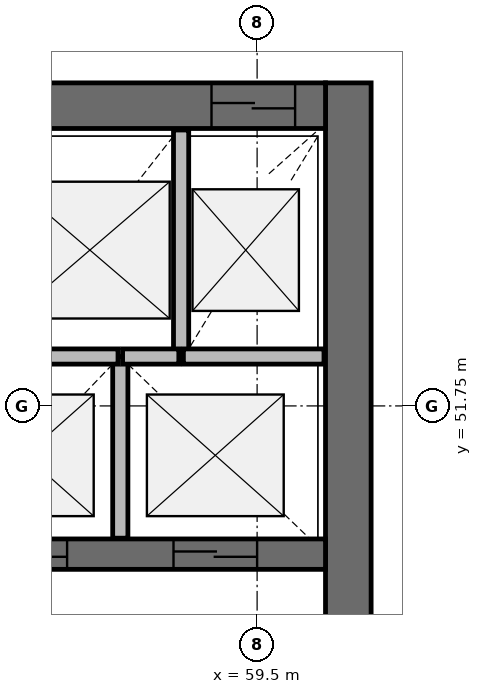
"""IFC4 building model, lengths in metres.
Left out: names, types, materials, properties, quantities, classifications, styles, units other than length and angle.
Written with IfcOpenShell. Run it as: python <this file> out.ifc"""

import sys

from ifc_helpers import new_model, si_unit, direction, frame, frame_2d, origin, place, context, subcontext, project, spatial, rectangle, extrude, source, transform, mapped, element, fill, save


model = new_model("IFC4")
c1 = context("Model", 3, precision=1e-05, world=origin(), true_north=direction((0.0, 1.0)))
c2 = subcontext(c1, "Body", "Model", "MODEL_VIEW")
j1 = project(units=[si_unit("LENGTHUNIT", "METRE"), si_unit("PLANEANGLEUNIT", "RADIAN")], contexts=[c1])
p1 = place(None, origin())
s1 = spatial("IfcSite", under=j1, at=p1, CompositionType="ELEMENT")
p2 = place(p1, origin())
s2 = spatial("IfcBuilding", under=s1, at=p2, CompositionType="ELEMENT")
p3 = place(p2, frame((0.0, 0.0, 234.5)))
s3 = spatial("IfcBuildingStorey", under=s2, at=p3, CompositionType="ELEMENT", Elevation=234.5)
p4 = place(p3, frame((60.7, 40.0, 0.0), z_axis=(0.0, 0.0, 1.0), x_axis=(0.0, 1.0, 0.0)))
e1 = element("IfcWall", 1, at=p4, inside=s3, PredefinedType="SHEAR", context=c2, shape_type="SweptSolid", body=[
    extrude(rectangle(XDim=16.0, YDim=0.6, at=frame_2d((8.0, 0.0))), origin(), (0.0, 0.0, 1.0), 3.9),
])
p5 = place(p4, frame((7.1, 0.0, 0.0)))
e2 = element("IfcOpeningElement", 2, at=p5, cuts=e1, PredefinedType="OPENING", context=c2, shape_type="SweptSolid", body=[
    extrude(rectangle(XDim=1.8, YDim=2.1, at=frame_2d((0.9, 1.05))), frame((0.0, 0.31, 0.0), z_axis=(0.0, -1.0, 0.0), x_axis=(1.0, 0.0, 0.0)), (0.0, 0.0, 1.0), 0.62),
])
p6 = place(p3, frame((60.4, 55.7, 0.0), z_axis=(0.0, 0.0, 1.0), x_axis=(-1.0, 0.0, 0.0)))
e3 = element("IfcWall", 3, at=p6, inside=s3, PredefinedType="SHEAR", context=c2, shape_type="SweptSolid", body=[
    extrude(rectangle(XDim=16.8, YDim=0.6, at=frame_2d((8.4, 0.0))), origin(), (0.0, 0.0, 1.0), 3.9),
])
p7 = place(p6, frame((0.4, 0.0, 0.0)))
e4 = element("IfcOpeningElement", 4, at=p7, cuts=e3, PredefinedType="OPENING", context=c2, shape_type="SweptSolid", body=[
    extrude(rectangle(XDim=1.1, YDim=2.1, at=frame_2d((0.55, 1.05))), frame((0.0, 0.31, 0.0), z_axis=(0.0, -1.0, 0.0), x_axis=(1.0, 0.0, 0.0)), (0.0, 0.0, 1.0), 0.62),
])
p8 = place(p6, frame((10.3, 0.0, 0.0)))
e5 = element("IfcOpeningElement", 5, at=p8, cuts=e3, PredefinedType="OPENING", context=c2, shape_type="SweptSolid", body=[
    extrude(rectangle(XDim=1.2, YDim=2.1, at=frame_2d((0.6, 1.05))), frame((0.0, 0.31, 0.0), z_axis=(0.0, -1.0, 0.0), x_axis=(1.0, 0.0, 0.0)), (0.0, 0.0, 1.0), 0.62),
])
p9 = place(p6, frame((7.25, 0.0, 0.0)))
e6 = element("IfcOpeningElement", 6, at=p9, cuts=e3, PredefinedType="OPENING", context=c2, shape_type="SweptSolid", body=[
    extrude(rectangle(XDim=1.1, YDim=2.1, at=frame_2d((0.55, 1.05))), frame((0.0, 0.31, 0.0), z_axis=(0.0, -1.0, 0.0), x_axis=(1.0, 0.0, 0.0)), (0.0, 0.0, 1.0), 0.62),
])
p10 = place(p3, frame((43.6, 49.8, 0.0), z_axis=(0.0, 0.0, 1.0), x_axis=(1.0, 0.0, 0.0)))
e7 = element("IfcWall", 7, at=p10, inside=s3, PredefinedType="SHEAR", context=c2, shape_type="SweptSolid", body=[
    extrude(rectangle(XDim=16.8, YDim=0.4, at=frame_2d((8.4, 0.0))), origin(), (0.0, 0.0, 1.0), 3.9),
])
p11 = place(p10, frame((9.8, 0.0, 0.0)))
e8 = element("IfcOpeningElement", 8, at=p11, cuts=e7, PredefinedType="OPENING", context=c2, shape_type="SweptSolid", body=[
    extrude(rectangle(XDim=1.1, YDim=2.1, at=frame_2d((0.55, 1.05))), frame((0.0, 0.21, 0.0), z_axis=(0.0, -1.0, 0.0), x_axis=(1.0, 0.0, 0.0)), (0.0, 0.0, 1.0), 0.42),
])
p12 = place(p10, frame((12.3, 0.0, 0.0)))
e9 = element("IfcOpeningElement", 9, at=p12, cuts=e7, PredefinedType="OPENING", context=c2, shape_type="SweptSolid", body=[
    extrude(rectangle(XDim=1.1, YDim=2.1, at=frame_2d((0.55, 1.05))), frame((0.0, 0.21, 0.0), z_axis=(0.0, -1.0, 0.0), x_axis=(1.0, 0.0, 0.0)), (0.0, 0.0, 1.0), 0.42),
])
p13 = place(p10, frame((14.8, 0.0, 0.0)))
e10 = element("IfcOpeningElement", 10, at=p13, cuts=e7, PredefinedType="OPENING", context=c2, shape_type="SweptSolid", body=[
    extrude(rectangle(XDim=1.1, YDim=2.1, at=frame_2d((0.55, 1.05))), frame((0.0, 0.21, 0.0), z_axis=(0.0, -1.0, 0.0), x_axis=(1.0, 0.0, 0.0)), (0.0, 0.0, 1.0), 0.42),
])
p14 = place(p10, frame((4.45, 0.0, 0.0)))
e11 = element("IfcOpeningElement", 11, at=p14, cuts=e7, PredefinedType="OPENING", context=c2, shape_type="SweptSolid", body=[
    extrude(rectangle(XDim=0.9, YDim=2.1, at=frame_2d((0.45, 1.05))), frame((0.0, 0.21, 0.0), z_axis=(0.0, -1.0, 0.0), x_axis=(1.0, 0.0, 0.0)), (0.0, 0.0, 1.0), 0.42),
])
p15 = place(p10, frame((7.85, 0.0, 0.0)))
e12 = element("IfcOpeningElement", 12, at=p15, cuts=e7, PredefinedType="OPENING", context=c2, shape_type="SweptSolid", body=[
    extrude(rectangle(XDim=0.9, YDim=2.1, at=frame_2d((0.45, 1.05))), frame((0.0, 0.21, 0.0), z_axis=(0.0, -1.0, 0.0), x_axis=(1.0, 0.0, 0.0)), (0.0, 0.0, 1.0), 0.42),
])
p16 = place(p3, frame((58.5, 52.4, 0.0), z_axis=(0.0, 0.0, 1.0), x_axis=(0.0, 1.0, 0.0)))
e13 = element("IfcWall", 13, at=p16, inside=s3, PredefinedType="SOLIDWALL", context=c2, shape_type="SweptSolid", body=[
    extrude(rectangle(XDim=2.98, YDim=0.2, at=frame_2d((1.49, 0.0))), origin(), (0.0, 0.0, 1.0), 3.58),
])
p17 = place(p3, frame((57.7, 50.01, 0.0), z_axis=(0.0, 0.0, 1.0), x_axis=(0.0, 1.0, 0.0)))
e14 = element("IfcWall", 14, at=p17, inside=s3, PredefinedType="SOLIDWALL", context=c2, shape_type="SweptSolid", body=[
    extrude(rectangle(XDim=2.39, YDim=0.2, at=frame_2d((1.195, 0.0))), origin(), (0.0, 0.0, 1.0), 3.58),
])
p18 = place(p3, frame((60.38, 52.4, 0.0), z_axis=(0.0, 0.0, 1.0), x_axis=(-1.0, 0.0, 0.0)))
e15 = element("IfcWall", 15, at=p18, inside=s3, PredefinedType="SOLIDWALL", context=c2, shape_type="SweptSolid", body=[
    extrude(rectangle(XDim=1.85, YDim=0.2, at=frame_2d((0.925, 0.0))), origin(), (0.0, 0.0, 1.0), 3.58),
])
p19 = place(p3, frame((57.67, 52.4, 0.0), z_axis=(0.0, 0.0, 1.0), x_axis=(-1.0, 0.0, 0.0)))
e16 = element("IfcWall", 16, at=p19, inside=s3, PredefinedType="SOLIDWALL", context=c2, shape_type="SweptSolid", body=[
    extrude(rectangle(XDim=1.54, YDim=0.2, at=frame_2d((0.77, 0.0))), origin(), (0.0, 0.0, 1.0), 3.58),
])
p20 = place(p3, frame((58.47, 52.4, 0.0), z_axis=(0.0, 0.0, 1.0), x_axis=(-1.0, 0.0, 0.0)))
e17 = element("IfcWall", 17, at=p20, inside=s3, PredefinedType="SOLIDWALL", context=c2, shape_type="SweptSolid", body=[
    extrude(rectangle(XDim=0.74, YDim=0.2, at=frame_2d((0.37, 0.0))), origin(), (0.0, 0.0, 1.0), 3.58),
])
m1 = source(origin(), c2, "Body", "SweptSolid", [
    extrude(rectangle(XDim=1.1, YDim=2.1, at=frame_2d((0.55, 1.05))), frame((0.0, 0.025, 0.0), z_axis=(0.0, -1.0, 0.0), x_axis=(1.0, 0.0, 0.0)), (0.0, 0.0, 1.0), 0.05),
])
p21 = place(p12, origin())
e18 = element("IfcDoor", 18, at=p21, inside=s3, OperationType="DOUBLE_DOOR_SLIDING", PredefinedType="USERDEFINED", context=c2, shape_type="MappedRepresentation", body=[
    mapped(m1, transform((0.0, 0.0, 0.0), scale=1.0)),
])
fill(e9, e18)
p22 = place(p13, origin())
e19 = element("IfcDoor", 19, at=p22, inside=s3, OperationType="DOUBLE_DOOR_SLIDING", PredefinedType="USERDEFINED", context=c2, shape_type="MappedRepresentation", body=[
    mapped(m1, transform((0.0, 0.0, 0.0), scale=1.0)),
])
fill(e10, e19)
p23 = place(p7, origin())
e20 = element("IfcDoor", 20, at=p23, inside=s3, OperationType="DOUBLE_DOOR_SLIDING", PredefinedType="USERDEFINED", context=c2, shape_type="MappedRepresentation", body=[
    mapped(m1, transform((0.0, 0.0, 0.0), scale=1.0)),
])
fill(e4, e20)
save(model, sys.argv[1])
